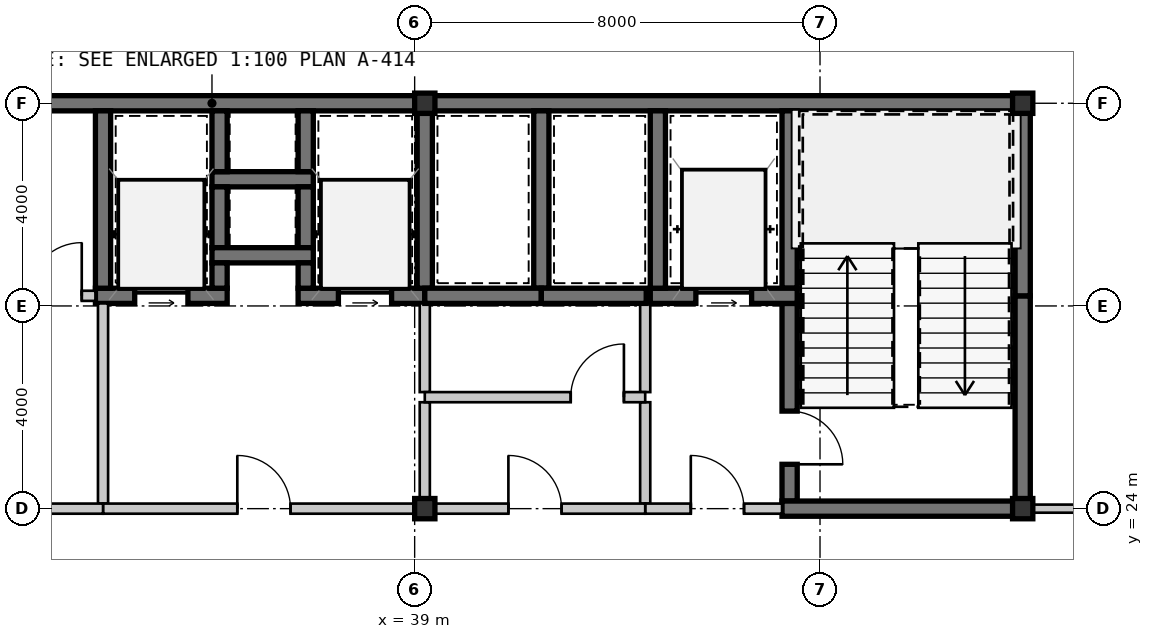
"""IFC4 building model, lengths in metres.
Left out: names, types, materials, properties, quantities, classifications, styles, units other than length and angle.
Written with IfcOpenShell. Run it as: python <this file> out.ifc"""

import sys

from ifc_helpers import new_model, si_unit, direction, frame, frame_2d, origin, origin_2d, place, context, subcontext, project, spatial, rectangle, hollow_rectangle, extrude, source, transform, mapped, element, fill, save


model = new_model("IFC4")
c1 = context("Model", 3, precision=1e-05, world=origin(), true_north=direction((0.0, 1.0)))
c2 = subcontext(c1, "Body", "Model", "MODEL_VIEW")
j1 = project(units=[si_unit("LENGTHUNIT", "METRE"), si_unit("PLANEANGLEUNIT", "RADIAN")], contexts=[c1])
p1 = place(None, origin())
s1 = spatial("IfcSite", under=j1, at=p1, CompositionType="ELEMENT")
p2 = place(p1, origin())
s2 = spatial("IfcBuilding", under=s1, at=p2, CompositionType="ELEMENT")
p3 = place(p2, frame((0.0, 0.0, 145.6)))
s3 = spatial("IfcBuildingStorey", under=s2, at=p3, CompositionType="ELEMENT", Elevation=145.6)
m1 = source(origin(), c2, "Body", "SweptSolid", [
    extrude(hollow_rectangle(XDim=0.4, YDim=0.4, WallThickness=0.016, at=origin_2d()), origin(), (0.0, 0.0, 1.0), 3.15),
])
for number, where, z_axis, x_axis in (
    (1, (39.2, 24.0, 0.0), (0.0, 0.0, 1.0), (1.0, 0.0, 0.0)),
    (2, (51.0, 24.0, 0.0), (0.0, 0.0, 1.0), (1.0, 0.0, 0.0)),
    (3, (39.2, 32.0, 0.0), (0.0, 0.0, 1.0), (1.0, 0.0, 0.0)),
    (4, (51.0, 32.0, 0.0), (0.0, 0.0, 1.0), (1.0, 0.0, 0.0)),
):
    element("IfcColumn", number, at=place(p3, frame(where, z_axis=z_axis, x_axis=x_axis)), inside=s3, PredefinedType="COLUMN", context=c2, shape_type="MappedRepresentation", body=[
        mapped(m1, transform((0.0, 0.0, 0.0), scale=1.0)),
    ])
m2 = source(origin(), c2, "Body", "SweptSolid", [
    extrude(rectangle(XDim=11.2, YDim=0.3, at=frame_2d((5.6, 0.0))), origin(), (0.0, 0.0, 1.0), 2.93),
])
p4 = place(p3, frame((28.0, 32.0, 0.0), z_axis=(0.0, 0.0, 1.0), x_axis=(1.0, 0.0, 0.0)))
e5 = element("IfcWall", 5, at=p4, inside=s3, PredefinedType="SHEAR", context=c2, shape_type="MappedRepresentation", body=[
    mapped(m2, transform((0.0, 0.0, 0.0), scale=1.0)),
])
m3 = source(origin(), c2, "Body", "SweptSolid", [
    extrude(rectangle(XDim=11.95, YDim=0.3, at=frame_2d((5.975, 0.0))), origin(), (0.0, 0.0, 1.0), 2.93),
])
p5 = place(p3, frame((39.2, 32.0, 0.0), z_axis=(0.0, 0.0, 1.0), x_axis=(1.0, 0.0, 0.0)))
e6 = element("IfcWall", 6, at=p5, inside=s3, PredefinedType="SHEAR", context=c2, shape_type="MappedRepresentation", body=[
    mapped(m3, transform((0.0, 0.0, 0.0), scale=1.0)),
])
m4 = source(origin(), c2, "Body", "SweptSolid", [
    extrude(rectangle(XDim=4.05, YDim=0.3, at=frame_2d((2.025, 0.0))), origin(), (0.0, 0.0, 1.0), 2.93),
])
p6 = place(p3, frame((51.0, 24.15, 0.0), z_axis=(0.0, 0.0, 1.0), x_axis=(0.0, 1.0, 0.0)))
e7 = element("IfcWall", 7, at=p6, inside=s3, PredefinedType="SHEAR", context=c2, shape_type="MappedRepresentation", body=[
    mapped(m4, transform((0.0, 0.0, 0.0), scale=1.0)),
])
m5 = source(origin(), c2, "Body", "SweptSolid", [
    extrude(rectangle(XDim=3.65, YDim=0.3, at=frame_2d((1.825, 0.0))), origin(), (0.0, 0.0, 1.0), 2.93),
])
p7 = place(p3, frame((51.0, 28.2, 0.0), z_axis=(0.0, 0.0, 1.0), x_axis=(0.0, 1.0, 0.0)))
e8 = element("IfcWall", 8, at=p7, inside=s3, PredefinedType="SHEAR", context=c2, shape_type="MappedRepresentation", body=[
    mapped(m5, transform((0.0, 0.0, 0.0), scale=1.0)),
])
m6 = source(origin(), c2, "Body", "SweptSolid", [
    extrude(rectangle(XDim=3.5, YDim=0.3, at=frame_2d((1.75, 0.0))), origin(), (0.0, 0.0, 1.0), 2.93),
])
p8 = place(p3, frame((46.4, 31.85, 0.0), z_axis=(0.0, 0.0, 1.0), x_axis=(0.0, -1.0, 0.0)))
e9 = element("IfcWall", 9, at=p8, inside=s3, PredefinedType="SHEAR", context=c2, shape_type="MappedRepresentation", body=[
    mapped(m6, transform((0.0, 0.0, 0.0), scale=1.0)),
])
m7 = source(origin(), c2, "Body", "SweptSolid", [
    extrude(rectangle(XDim=3.9, YDim=0.3, at=frame_2d((1.95, 0.0))), origin(), (0.0, 0.0, 1.0), 2.93),
])
p9 = place(p3, frame((46.4, 28.05, 0.0), z_axis=(0.0, 0.0, 1.0), x_axis=(0.0, -1.0, 0.0)))
e10 = element("IfcWall", 10, at=p9, inside=s3, PredefinedType="SHEAR", context=c2, shape_type="MappedRepresentation", body=[
    mapped(m7, transform((0.0, 0.0, 0.0), scale=1.0)),
])
m8 = source(origin(), c2, "Body", "SweptSolid", [
    extrude(rectangle(XDim=1.05, YDim=2.1, at=frame_2d((0.525, 1.05))), frame((0.0, 0.16, 0.0), z_axis=(0.0, -1.0, 0.0), x_axis=(1.0, 0.0, 0.0)), (0.0, 0.0, 1.0), 0.32),
])
p10 = place(p9, frame((2.125, 0.0, 0.0)))
e11 = element("IfcOpeningElement", 11, at=p10, cuts=e10, PredefinedType="OPENING", context=c2, shape_type="MappedRepresentation", body=[
    mapped(m8, transform((0.0, 0.0, 0.0), scale=1.0)),
])
m9 = source(origin(), c2, "Body", "SweptSolid", [
    extrude(rectangle(XDim=4.9, YDim=0.3, at=frame_2d((2.45, 0.0))), origin(), (0.0, 0.0, 1.0), 2.93),
])
p11 = place(p3, frame((46.25, 24.0, 0.0), z_axis=(0.0, 0.0, 1.0), x_axis=(1.0, 0.0, 0.0)))
e12 = element("IfcWall", 12, at=p11, inside=s3, PredefinedType="SHEAR", context=c2, shape_type="MappedRepresentation", body=[
    mapped(m9, transform((0.0, 0.0, 0.0), scale=1.0)),
])
m10 = source(origin(), c2, "Body", "SweptSolid", [
    extrude(rectangle(XDim=2.9, YDim=0.3, at=frame_2d((1.45, 0.0))), origin(), (0.0, 0.0, 1.0), 2.93),
])
p12 = place(p3, frame((43.65, 28.2, 0.0), z_axis=(0.0, 0.0, 1.0), x_axis=(1.0, 0.0, 0.0)))
e13 = element("IfcWall", 13, at=p12, inside=s3, PredefinedType="SHEAR", context=c2, shape_type="MappedRepresentation", body=[
    mapped(m10, transform((0.0, 0.0, 0.0), scale=1.0)),
])
m11 = source(origin(), c2, "Body", "SweptSolid", [
    extrude(rectangle(XDim=1.1, YDim=2.15, at=frame_2d((0.55, 1.075))), frame((0.0, 0.16, 0.0), z_axis=(0.0, -1.0, 0.0), x_axis=(1.0, 0.0, 0.0)), (0.0, 0.0, 1.0), 0.32),
])
p13 = place(p12, frame((0.9, 0.0, 0.0)))
e14 = element("IfcOpeningElement", 14, at=p13, cuts=e13, PredefinedType="OPENING", context=c2, shape_type="MappedRepresentation", body=[
    mapped(m11, transform((0.0, 0.0, 0.0), scale=1.0)),
])
p14 = place(p3, frame((43.8, 31.85, 0.0), z_axis=(0.0, 0.0, 1.0), x_axis=(0.0, -1.0, 0.0)))
e15 = element("IfcWall", 15, at=p14, inside=s3, PredefinedType="SHEAR", context=c2, shape_type="MappedRepresentation", body=[
    mapped(m6, transform((0.0, 0.0, 0.0), scale=1.0)),
])
m12 = source(origin(), c2, "Body", "SweptSolid", [
    extrude(rectangle(XDim=2.0, YDim=0.2, at=frame_2d((1.0, 0.0))), origin(), (0.0, 0.0, 1.0), 2.93),
])
p15 = place(p3, frame((43.55, 26.1, 0.0), z_axis=(0.0, 0.0, 1.0), x_axis=(0.0, -1.0, 0.0)))
e16 = element("IfcWall", 16, at=p15, inside=s3, PredefinedType="SOLIDWALL", context=c2, shape_type="MappedRepresentation", body=[
    mapped(m12, transform((0.0, 0.0, 0.0), scale=1.0)),
])
m13 = source(origin(), c2, "Body", "SweptSolid", [
    extrude(rectangle(XDim=1.75, YDim=0.2, at=frame_2d((0.875, 0.0))), origin(), (0.0, 0.0, 1.0), 2.93),
])
p16 = place(p3, frame((43.55, 28.05, 0.0), z_axis=(0.0, 0.0, 1.0), x_axis=(0.0, -1.0, 0.0)))
e17 = element("IfcWall", 17, at=p16, inside=s3, PredefinedType="SOLIDWALL", context=c2, shape_type="MappedRepresentation", body=[
    mapped(m13, transform((0.0, 0.0, 0.0), scale=1.0)),
])
m14 = source(origin(), c2, "Body", "SweptSolid", [
    extrude(rectangle(XDim=2.7, YDim=0.2, at=frame_2d((1.35, 0.0))), origin(), (0.0, 0.0, 1.0), 2.397),
])
p17 = place(p3, frame((43.55, 24.0, 0.0), z_axis=(0.0, 0.0, 1.0), x_axis=(1.0, 0.0, 0.0)))
e18 = element("IfcWall", 18, at=p17, inside=s3, PredefinedType="SOLIDWALL", context=c2, shape_type="MappedRepresentation", body=[
    mapped(m14, transform((0.0, 0.0, 0.0), scale=1.0)),
])
m15 = source(origin(), c2, "Body", "SweptSolid", [
    extrude(rectangle(XDim=1.05, YDim=2.1, at=frame_2d((0.525, 1.05))), frame((0.0, 0.11, 0.0), z_axis=(0.0, -1.0, 0.0), x_axis=(1.0, 0.0, 0.0)), (0.0, 0.0, 1.0), 0.22),
])
p18 = place(p17, frame((0.9, 0.0, 0.0)))
e19 = element("IfcOpeningElement", 19, at=p18, cuts=e18, PredefinedType="OPENING", context=c2, shape_type="MappedRepresentation", body=[
    mapped(m15, transform((0.0, 0.0, 0.0), scale=1.0)),
])
m16 = source(origin(), c2, "Body", "SweptSolid", [
    extrude(rectangle(XDim=2.0, YDim=0.3, at=frame_2d((1.0, 0.0))), origin(), (0.0, 0.0, 1.0), 2.93),
])
p19 = place(p3, frame((35.0, 30.5, 0.0), z_axis=(0.0, 0.0, 1.0), x_axis=(1.0, 0.0, 0.0)))
e20 = element("IfcWall", 20, at=p19, inside=s3, PredefinedType="SHEAR", context=c2, shape_type="MappedRepresentation", body=[
    mapped(m16, transform((0.0, 0.0, 0.0), scale=1.0)),
])
m17 = source(origin(), c2, "Body", "SweptSolid", [
    extrude(rectangle(XDim=1.2, YDim=0.3, at=frame_2d((0.6, 0.0))), origin(), (0.0, 0.0, 1.0), 2.93),
])
for number, where, z_axis, x_axis in (
    (21, (35.15, 31.85, 0.0), (0.0, 0.0, 1.0), (0.0, -1.0, 0.0)),
    (22, (36.85, 30.65, 0.0), (0.0, 0.0, 1.0), (0.0, 1.0, 0.0)),
    (23, (35.15, 30.35, 0.0), (0.0, 0.0, 1.0), (0.0, -1.0, 0.0)),
    (24, (36.85, 29.15, 0.0), (0.0, 0.0, 1.0), (0.0, 1.0, 0.0)),
):
    element("IfcWall", number, at=place(p3, frame(where, z_axis=z_axis, x_axis=x_axis)), inside=s3, PredefinedType="SHEAR", context=c2, shape_type="MappedRepresentation", body=[
        mapped(m17, transform((0.0, 0.0, 0.0), scale=1.0)),
    ])
p20 = place(p3, frame((35.0, 29.0, 0.0), z_axis=(0.0, 0.0, 1.0), x_axis=(1.0, 0.0, 0.0)))
e25 = element("IfcWall", 25, at=p20, inside=s3, PredefinedType="SHEAR", context=c2, shape_type="MappedRepresentation", body=[
    mapped(m16, transform((0.0, 0.0, 0.0), scale=1.0)),
])
m18 = source(origin(), c2, "Body", "SweptSolid", [
    extrude(rectangle(XDim=2.6, YDim=0.3, at=frame_2d((1.3, 0.0))), origin(), (0.0, 0.0, 1.0), 2.93),
])
p21 = place(p3, frame((32.7, 28.2, 0.0), z_axis=(0.0, 0.0, 1.0), x_axis=(1.0, 0.0, 0.0)))
e26 = element("IfcWall", 26, at=p21, inside=s3, PredefinedType="SHEAR", context=c2, shape_type="MappedRepresentation", body=[
    mapped(m18, transform((0.0, 0.0, 0.0), scale=1.0)),
])
m19 = source(origin(), c2, "Body", "SweptSolid", [
    extrude(rectangle(XDim=1.05, YDim=2.15, at=frame_2d((0.525, 1.075))), frame((0.0, 0.16, 0.0), z_axis=(0.0, -1.0, 0.0), x_axis=(1.0, 0.0, 0.0)), (0.0, 0.0, 1.0), 0.32),
])
p22 = place(p21, frame((0.775, 0.0, 0.0)))
e27 = element("IfcOpeningElement", 27, at=p22, cuts=e26, PredefinedType="OPENING", context=c2, shape_type="MappedRepresentation", body=[
    mapped(m19, transform((0.0, 0.0, 0.0), scale=1.0)),
])
m20 = source(origin(), c2, "Body", "SweptSolid", [
    extrude(rectangle(XDim=0.5, YDim=0.3, at=frame_2d((0.25, 0.0))), origin(), (0.0, 0.0, 1.0), 2.93),
])
p23 = place(p3, frame((35.15, 28.35, 0.0), z_axis=(0.0, 0.0, 1.0), x_axis=(0.0, 1.0, 0.0)))
e28 = element("IfcWall", 28, at=p23, inside=s3, PredefinedType="SHEAR", context=c2, shape_type="MappedRepresentation", body=[
    mapped(m20, transform((0.0, 0.0, 0.0), scale=1.0)),
])
p24 = place(p3, frame((32.85, 31.85, 0.0), z_axis=(0.0, 0.0, 1.0), x_axis=(0.0, -1.0, 0.0)))
e29 = element("IfcWall", 29, at=p24, inside=s3, PredefinedType="SHEAR", context=c2, shape_type="MappedRepresentation", body=[
    mapped(m6, transform((0.0, 0.0, 0.0), scale=1.0)),
])
m21 = source(origin(), c2, "Body", "SweptSolid", [
    extrude(rectangle(XDim=2.5, YDim=0.3, at=frame_2d((1.25, 0.0))), origin(), (0.0, 0.0, 1.0), 2.93),
])
p25 = place(p3, frame((36.7, 28.2, 0.0), z_axis=(0.0, 0.0, 1.0), x_axis=(1.0, 0.0, 0.0)))
e30 = element("IfcWall", 30, at=p25, inside=s3, PredefinedType="SHEAR", context=c2, shape_type="MappedRepresentation", body=[
    mapped(m21, transform((0.0, 0.0, 0.0), scale=1.0)),
])
p26 = place(p25, frame((0.795, 0.0, 0.0)))
e31 = element("IfcOpeningElement", 31, at=p26, cuts=e30, PredefinedType="OPENING", context=c2, shape_type="MappedRepresentation", body=[
    mapped(m19, transform((0.0, 0.0, 0.0), scale=1.0)),
])
p27 = place(p3, frame((36.85, 28.85, 0.0), z_axis=(0.0, 0.0, 1.0), x_axis=(0.0, -1.0, 0.0)))
e32 = element("IfcWall", 32, at=p27, inside=s3, PredefinedType="SHEAR", context=c2, shape_type="MappedRepresentation", body=[
    mapped(m20, transform((0.0, 0.0, 0.0), scale=1.0)),
])
p28 = place(p3, frame((39.2, 28.35, 0.0), z_axis=(0.0, 0.0, 1.0), x_axis=(0.0, 1.0, 0.0)))
e33 = element("IfcWall", 33, at=p28, inside=s3, PredefinedType="SHEAR", context=c2, shape_type="MappedRepresentation", body=[
    mapped(m6, transform((0.0, 0.0, 0.0), scale=1.0)),
])
m22 = source(origin(), c2, "Body", "SweptSolid", [
    extrude(rectangle(XDim=3.95, YDim=0.2, at=frame_2d((1.975, 0.0))), origin(), (0.0, 0.0, 1.0), 2.93),
])
p29 = place(p3, frame((32.85, 24.1, 0.0), z_axis=(0.0, 0.0, 1.0), x_axis=(0.0, 1.0, 0.0)))
e34 = element("IfcWall", 34, at=p29, inside=s3, PredefinedType="SOLIDWALL", context=c2, shape_type="MappedRepresentation", body=[
    mapped(m22, transform((0.0, 0.0, 0.0), scale=1.0)),
])
m23 = source(origin(), c2, "Body", "SweptSolid", [
    extrude(rectangle(XDim=2.0, YDim=0.2, at=frame_2d((1.0, 0.0))), origin(), (0.0, 0.0, 1.0), 2.47),
])
p30 = place(p3, frame((39.2, 26.1, 0.0), z_axis=(0.0, 0.0, 1.0), x_axis=(0.0, -1.0, 0.0)))
e35 = element("IfcWall", 35, at=p30, inside=s3, PredefinedType="SOLIDWALL", context=c2, shape_type="MappedRepresentation", body=[
    mapped(m23, transform((0.0, 0.0, 0.0), scale=1.0)),
])
m24 = source(origin(), c2, "Body", "SweptSolid", [
    extrude(rectangle(XDim=1.75, YDim=0.2, at=frame_2d((0.875, 0.0))), origin(), (0.0, 0.0, 1.0), 2.47),
])
p31 = place(p3, frame((39.2, 28.05, 0.0), z_axis=(0.0, 0.0, 1.0), x_axis=(0.0, -1.0, 0.0)))
e36 = element("IfcWall", 36, at=p31, inside=s3, PredefinedType="SOLIDWALL", context=c2, shape_type="MappedRepresentation", body=[
    mapped(m24, transform((0.0, 0.0, 0.0), scale=1.0)),
])
m25 = source(origin(), c2, "Body", "SweptSolid", [
    extrude(rectangle(XDim=6.35, YDim=0.2, at=frame_2d((3.175, 0.0))), origin(), (0.0, 0.0, 1.0), 2.47),
])
p32 = place(p3, frame((39.2, 24.0, 0.0), z_axis=(0.0, 0.0, 1.0), x_axis=(-1.0, 0.0, 0.0)))
e37 = element("IfcWall", 37, at=p32, inside=s3, PredefinedType="SOLIDWALL", context=c2, shape_type="MappedRepresentation", body=[
    mapped(m25, transform((0.0, 0.0, 0.0), scale=1.0)),
])
p33 = place(p32, frame((2.65, 0.0, 0.0)))
e38 = element("IfcOpeningElement", 38, at=p33, cuts=e37, PredefinedType="OPENING", context=c2, shape_type="MappedRepresentation", body=[
    mapped(m15, transform((0.0, 0.0, 0.0), scale=1.0)),
])
p34 = place(p3, frame((41.5, 28.35, 0.0), z_axis=(0.0, 0.0, 1.0), x_axis=(0.0, 1.0, 0.0)))
e39 = element("IfcWall", 39, at=p34, inside=s3, PredefinedType="SHEAR", context=c2, shape_type="MappedRepresentation", body=[
    mapped(m6, transform((0.0, 0.0, 0.0), scale=1.0)),
])
m26 = source(origin(), c2, "Body", "SweptSolid", [
    extrude(rectangle(XDim=2.3, YDim=0.3, at=frame_2d((1.15, 0.0))), origin(), (0.0, 0.0, 1.0), 2.93),
])
p35 = place(p3, frame((39.2, 28.2, 0.0), z_axis=(0.0, 0.0, 1.0), x_axis=(1.0, 0.0, 0.0)))
e40 = element("IfcWall", 40, at=p35, inside=s3, PredefinedType="SHEAR", context=c2, shape_type="MappedRepresentation", body=[
    mapped(m26, transform((0.0, 0.0, 0.0), scale=1.0)),
])
m27 = source(origin(), c2, "Body", "SweptSolid", [
    extrude(rectangle(XDim=2.07, YDim=0.3, at=frame_2d((1.035, 0.0))), origin(), (0.0, 0.0, 1.0), 2.93),
])
p36 = place(p3, frame((41.5, 28.2, 0.0), z_axis=(0.0, 0.0, 1.0), x_axis=(1.0, 0.0, 0.0)))
e41 = element("IfcWall", 41, at=p36, inside=s3, PredefinedType="SHEAR", context=c2, shape_type="MappedRepresentation", body=[
    mapped(m27, transform((0.0, 0.0, 0.0), scale=1.0)),
])
m28 = source(origin(), c2, "Body", "SweptSolid", [
    extrude(rectangle(XDim=6.25, YDim=0.2, at=frame_2d((3.125, 0.0))), origin(), (0.0, 0.0, 1.0), 2.93),
])
p37 = place(p3, frame((26.45, 28.2, 0.0), z_axis=(0.0, 0.0, 1.0), x_axis=(1.0, 0.0, 0.0)))
e42 = element("IfcWall", 42, at=p37, inside=s3, PredefinedType="SOLIDWALL", context=c2, shape_type="MappedRepresentation", body=[
    mapped(m28, transform((0.0, 0.0, 0.0), scale=1.0)),
])
p38 = place(p37, frame((4.93, 0.0, 0.0)))
e43 = element("IfcOpeningElement", 43, at=p38, cuts=e42, PredefinedType="OPENING", context=c2, shape_type="MappedRepresentation", body=[
    mapped(m15, transform((0.0, 0.0, 0.0), scale=1.0)),
])
m29 = source(origin(), c2, "Body", "SweptSolid", [
    extrude(rectangle(XDim=6.4, YDim=0.2, at=frame_2d((3.2, 0.0))), origin(), (0.0, 0.0, 1.0), 2.47),
])
p39 = place(p3, frame((32.85, 24.0, 0.0), z_axis=(0.0, 0.0, 1.0), x_axis=(-1.0, 0.0, 0.0)))
e44 = element("IfcWall", 44, at=p39, inside=s3, PredefinedType="SOLIDWALL", context=c2, shape_type="MappedRepresentation", body=[
    mapped(m29, transform((0.0, 0.0, 0.0), scale=1.0)),
])
p40 = place(p39, frame((2.675, 0.0, 0.0)))
e45 = element("IfcOpeningElement", 45, at=p40, cuts=e44, PredefinedType="OPENING", context=c2, shape_type="MappedRepresentation", body=[
    mapped(m15, transform((0.0, 0.0, 0.0), scale=1.0)),
])
m30 = source(origin(), c2, "Body", "SweptSolid", [
    extrude(rectangle(XDim=4.35, YDim=0.2, at=frame_2d((2.175, 0.0))), origin(), (0.0, 0.0, 1.0), 2.93),
])
p41 = place(p3, frame((39.2, 26.2, 0.0), z_axis=(0.0, 0.0, 1.0), x_axis=(1.0, 0.0, 0.0)))
e46 = element("IfcWall", 46, at=p41, inside=s3, PredefinedType="SOLIDWALL", context=c2, shape_type="MappedRepresentation", body=[
    mapped(m30, transform((0.0, 0.0, 0.0), scale=1.0)),
])
p42 = place(p41, frame((2.88, 0.0, 0.0)))
e47 = element("IfcOpeningElement", 47, at=p42, cuts=e46, PredefinedType="OPENING", context=c2, shape_type="MappedRepresentation", body=[
    mapped(m15, transform((0.0, 0.0, 0.0), scale=1.0)),
])
m31 = source(origin(), c2, "Body", "SweptSolid", [
    extrude(rectangle(XDim=4.35, YDim=0.2, at=frame_2d((2.175, 0.0))), origin(), (0.0, 0.0, 1.0), 2.397),
])
p43 = place(p3, frame((43.55, 24.0, 0.0), z_axis=(0.0, 0.0, 1.0), x_axis=(-1.0, 0.0, 0.0)))
e48 = element("IfcWall", 48, at=p43, inside=s3, PredefinedType="SOLIDWALL", context=c2, shape_type="MappedRepresentation", body=[
    mapped(m31, transform((0.0, 0.0, 0.0), scale=1.0)),
])
p44 = place(p43, frame((1.65, 0.0, 0.0)))
e49 = element("IfcOpeningElement", 49, at=p44, cuts=e48, PredefinedType="OPENING", context=c2, shape_type="MappedRepresentation", body=[
    mapped(m15, transform((0.0, 0.0, 0.0), scale=1.0)),
])
m32 = source(origin(), c2, "Body", "SweptSolid", [
    extrude(rectangle(XDim=10.1, YDim=0.16, at=frame_2d((5.05, 0.0))), origin(), (0.0, 0.0, 1.0), 2.93),
])
p45 = place(p3, frame((51.15, 24.0, 0.0), z_axis=(0.0, 0.0, 1.0), x_axis=(1.0, 0.0, 0.0)))
e50 = element("IfcWall", 50, at=p45, inside=s3, PredefinedType="PARTITIONING", context=c2, shape_type="MappedRepresentation", body=[
    mapped(m32, transform((0.0, 0.0, 0.0), scale=1.0)),
])
m33 = source(origin(), c2, "Body", "SweptSolid", [
    extrude(rectangle(XDim=0.92, YDim=2.1, at=frame_2d((0.46, 1.05))), frame((0.0, 0.09, 0.0), z_axis=(0.0, -1.0, 0.0), x_axis=(1.0, 0.0, 0.0)), (0.0, 0.0, 1.0), 0.18),
])
p46 = place(p45, frame((4.525, 0.0, 0.0)))
e51 = element("IfcOpeningElement", 51, at=p46, cuts=e50, PredefinedType="OPENING", context=c2, shape_type="MappedRepresentation", body=[
    mapped(m33, transform((0.0, 0.0, 0.0), scale=1.0)),
])
m34 = source(origin(), c2, "Body", "SweptSolid", [
    extrude(rectangle(XDim=1.05, YDim=2.1, at=frame_2d((0.525, 1.05))), frame((0.0, 0.025, 0.0), z_axis=(0.0, -1.0, 0.0), x_axis=(1.0, 0.0, 0.0)), (0.0, 0.0, 1.0), 0.05),
])
p47 = place(p10, origin())
e52 = element("IfcDoor", 52, at=p47, inside=s3, OperationType="SINGLE_SWING_RIGHT", PredefinedType="DOOR", context=c2, shape_type="MappedRepresentation", body=[
    mapped(m34, transform((0.0, 0.0, 0.0), scale=1.0)),
])
fill(e11, e52)
m35 = source(origin(), c2, "Body", "SweptSolid", [
    extrude(rectangle(XDim=1.1, YDim=2.15, at=frame_2d((0.55, 1.075))), frame((0.0, 0.025, 0.0), z_axis=(0.0, -1.0, 0.0), x_axis=(1.0, 0.0, 0.0)), (0.0, 0.0, 1.0), 0.05),
])
p48 = place(p13, origin())
e53 = element("IfcDoor", 53, at=p48, inside=s3, OperationType="SLIDING_TO_LEFT", PredefinedType="DOOR", context=c2, shape_type="MappedRepresentation", body=[
    mapped(m35, transform((0.0, 0.0, 0.0), scale=1.0)),
])
fill(e14, e53)
p49 = place(p18, origin())
e54 = element("IfcDoor", 54, at=p49, inside=s3, OperationType="SINGLE_SWING_LEFT", PredefinedType="DOOR", context=c2, shape_type="MappedRepresentation", body=[
    mapped(m34, transform((0.0, 0.0, 0.0), scale=1.0)),
])
fill(e19, e54)
m36 = source(origin(), c2, "Body", "SweptSolid", [
    extrude(rectangle(XDim=1.05, YDim=2.15, at=frame_2d((0.525, 1.075))), frame((0.0, 0.025, 0.0), z_axis=(0.0, -1.0, 0.0), x_axis=(1.0, 0.0, 0.0)), (0.0, 0.0, 1.0), 0.05),
])
p50 = place(p22, origin())
e55 = element("IfcDoor", 55, at=p50, inside=s3, OperationType="SLIDING_TO_LEFT", PredefinedType="DOOR", context=c2, shape_type="MappedRepresentation", body=[
    mapped(m36, transform((0.0, 0.0, 0.0), scale=1.0)),
])
fill(e27, e55)
p51 = place(p26, origin())
e56 = element("IfcDoor", 56, at=p51, inside=s3, OperationType="SLIDING_TO_LEFT", PredefinedType="DOOR", context=c2, shape_type="MappedRepresentation", body=[
    mapped(m36, transform((0.0, 0.0, 0.0), scale=1.0)),
])
fill(e31, e56)
p52 = place(p33, frame((1.05, 0.0, 0.0), z_axis=(0.0, 0.0, 1.0), x_axis=(-1.0, 0.0, 0.0)))
e57 = element("IfcDoor", 57, at=p52, inside=s3, OperationType="SINGLE_SWING_LEFT", PredefinedType="DOOR", context=c2, shape_type="MappedRepresentation", body=[
    mapped(m34, transform((0.0, 0.0, 0.0), scale=1.0)),
])
fill(e38, e57)
p53 = place(p38, origin())
e58 = element("IfcDoor", 58, at=p53, inside=s3, OperationType="SINGLE_SWING_RIGHT", PredefinedType="DOOR", context=c2, shape_type="MappedRepresentation", body=[
    mapped(m34, transform((0.0, 0.0, 0.0), scale=1.0)),
])
fill(e43, e58)
p54 = place(p42, origin())
e59 = element("IfcDoor", 59, at=p54, inside=s3, OperationType="SINGLE_SWING_RIGHT", PredefinedType="DOOR", context=c2, shape_type="MappedRepresentation", body=[
    mapped(m34, transform((0.0, 0.0, 0.0), scale=1.0)),
])
fill(e47, e59)
p55 = place(p44, frame((1.05, 0.0, 0.0), z_axis=(0.0, 0.0, 1.0), x_axis=(-1.0, 0.0, 0.0)))
e60 = element("IfcDoor", 60, at=p55, inside=s3, OperationType="SINGLE_SWING_LEFT", PredefinedType="DOOR", context=c2, shape_type="MappedRepresentation", body=[
    mapped(m34, transform((0.0, 0.0, 0.0), scale=1.0)),
])
fill(e49, e60)
save(model, sys.argv[1])
